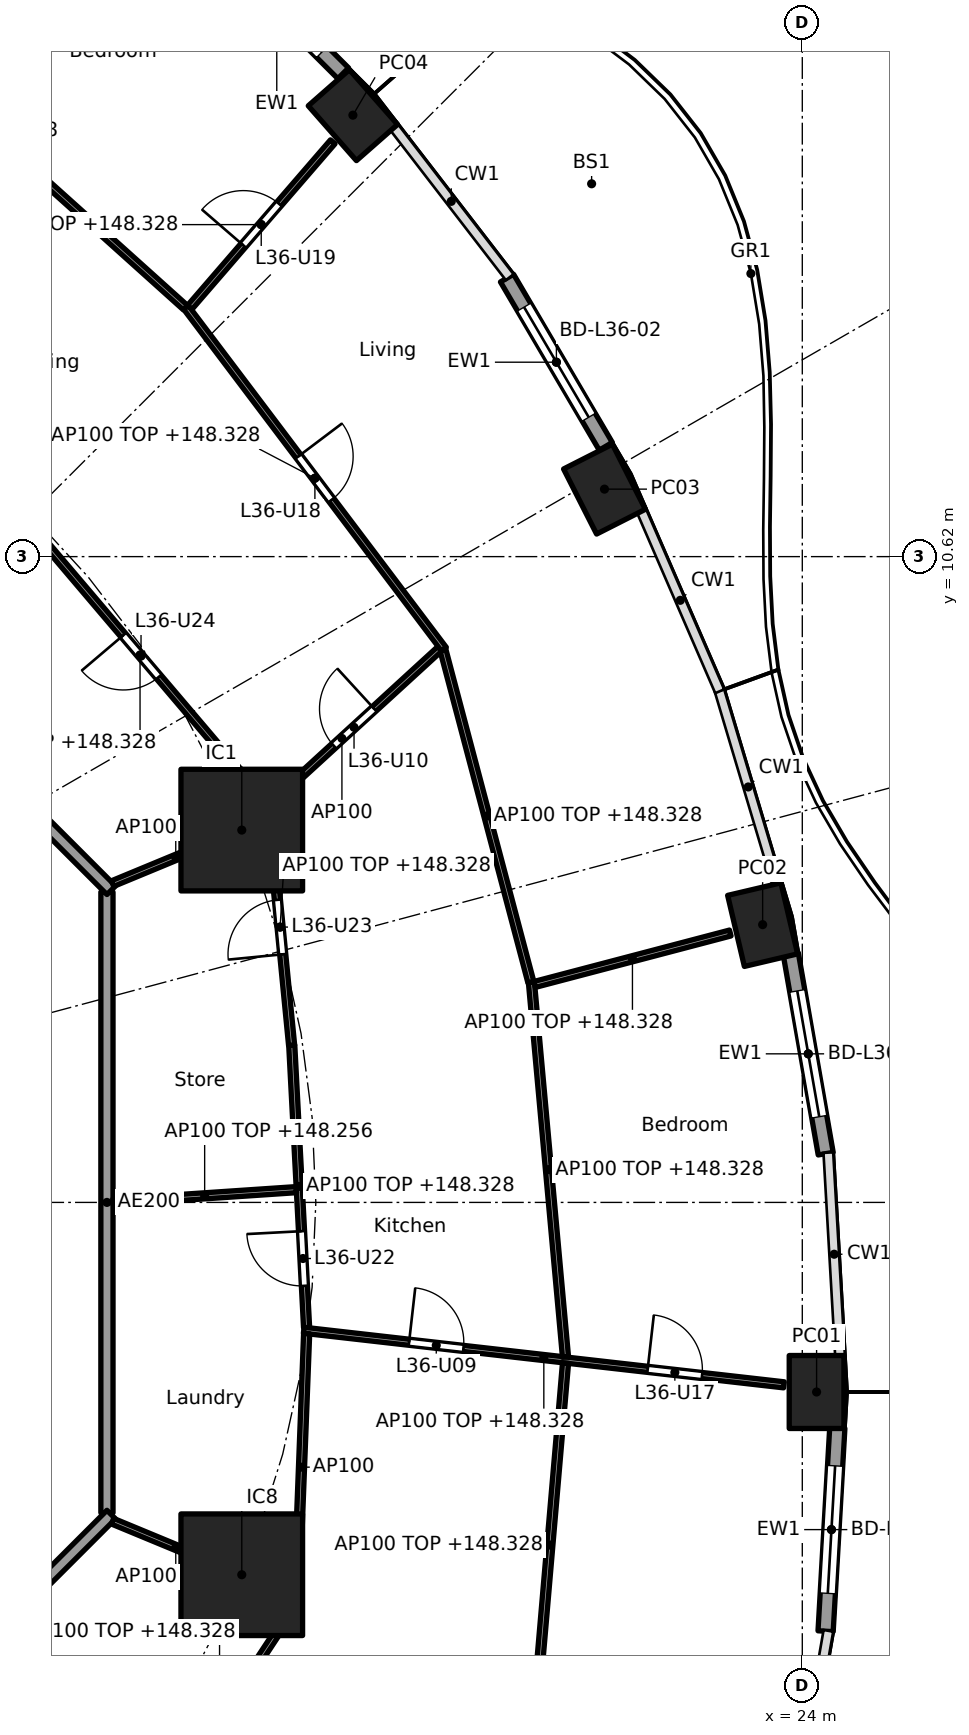
"""IFC4 building model, lengths in metres.
Left out: names, types, materials, properties, quantities, classifications, styles, units other than length and angle.
Written with IfcOpenShell. Run it as: python <this file> out.ifc"""

import sys

from ifc_helpers import new_model, si_unit, direction, frame, frame_2d, origin, origin_2d, place, context, subcontext, project, spatial, rectangle, hollow_rectangle, extrude, element, fill, save


model = new_model("IFC4")
c1 = context("Model", 3, precision=1e-05, world=origin(), true_north=direction((0.0, 1.0)))
c2 = subcontext(c1, "Body", "Model", "MODEL_VIEW")
j1 = project(units=[si_unit("LENGTHUNIT", "METRE"), si_unit("PLANEANGLEUNIT", "RADIAN")], contexts=[c1])
p1 = place(None, origin())
s1 = spatial("IfcSite", under=j1, at=p1, CompositionType="ELEMENT")
p2 = place(p1, origin())
s2 = spatial("IfcBuilding", under=s1, at=p2, CompositionType="ELEMENT")
p3 = place(p2, frame((0.0, 0.0, 145.5)))
s3 = spatial("IfcBuildingStorey", under=s2, at=p3, CompositionType="ELEMENT", Elevation=145.5)
for number, where, z_axis, x_axis in (
    (1, (24.235, -3.118, 0.0), (0.0, 0.0, 1.0), (0.0, 1.0, 0.0)),
    (2, (23.348, 4.568, 0.0), (0.0, 0.0, 1.0), (-0.229, 0.973, 0.0)),
    (3, (20.747, 11.73, 0.0), (0.0, 0.0, 1.0), (-0.452, 0.892, 0.0)),
    (4, (16.61, 17.88, 0.0), (0.0, 0.0, 1.0), (-0.66, 0.751, 0.0)),
):
    element("IfcColumn", number, at=place(p3, frame(where, z_axis=z_axis, x_axis=x_axis)), inside=s3, PredefinedType="COLUMN", context=c2, shape_type="SweptSolid", body=[
        extrude(hollow_rectangle(XDim=1.2, YDim=0.9, WallThickness=0.04, at=origin_2d()), origin(), (0.0, 0.0, 1.0), 3.7),
    ])
for number, where, z_axis, x_axis in (
    (5, (14.782, 6.123, 0.0), (0.0, 0.0, 1.0), (1.0, 0.0, 0.0)),
    (6, (14.782, -6.123, 0.0), (0.0, 0.0, 1.0), (1.0, 0.0, 0.0)),
):
    element("IfcColumn", number, at=place(p3, frame(where, z_axis=z_axis, x_axis=x_axis)), inside=s3, PredefinedType="COLUMN", context=c2, shape_type="SweptSolid", body=[
        extrude(rectangle(XDim=2.0, YDim=2.0, at=origin_2d()), origin(), (0.0, 0.0, 1.0), 3.7),
    ])
p4 = place(p3, frame((23.811, 4.085, 0.0), z_axis=(0.0, 0.0, 1.0), x_axis=(0.172163521006, -0.985068384446, 0.0)))
e7 = element("IfcWall", 7, at=p4, inside=s3, PredefinedType="SOLIDWALL", context=c2, shape_type="SweptSolid", body=[
    extrude(rectangle(XDim=3.333, YDim=0.25, at=frame_2d((1.666, 0.0))), origin(), (0.0, 0.0, 1.0), 3.44),
])
p5 = place(p4, frame((0.616, 0.0, 0.0)))
e8 = element("IfcOpeningElement", 8, at=p5, cuts=e7, PredefinedType="OPENING", context=c2, shape_type="SweptSolid", body=[
    extrude(rectangle(XDim=2.1, YDim=2.4, at=frame_2d((1.05, 1.2))), frame((0.0, 0.135, 0.0), z_axis=(0.0, -1.0, 0.0), x_axis=(1.0, 0.0, 0.0)), (0.0, 0.0, 1.0), 0.27),
])
p6 = place(p3, frame((19.144, 15.201, 0.0), z_axis=(0.0, 0.0, 1.0), x_axis=(0.506314982873, -0.862348617508, 0.0)))
e9 = element("IfcWall", 9, at=p6, inside=s3, PredefinedType="SOLIDWALL", context=c2, shape_type="SweptSolid", body=[
    extrude(rectangle(XDim=3.208, YDim=0.25, at=frame_2d((1.604, 0.0))), origin(), (0.0, 0.0, 1.0), 3.44),
])
p7 = place(p6, frame((0.554, 0.0, 0.0)))
e10 = element("IfcOpeningElement", 10, at=p7, cuts=e9, PredefinedType="OPENING", context=c2, shape_type="SweptSolid", body=[
    extrude(rectangle(XDim=2.1, YDim=2.4, at=frame_2d((1.05, 1.2))), frame((0.0, 0.135, 0.0), z_axis=(0.0, -1.0, 0.0), x_axis=(1.0, 0.0, 0.0)), (0.0, 0.0, 1.0), 0.27),
])
p8 = place(p3, frame((14.265, 20.749, 0.0), z_axis=(0.0, 0.0, 1.0), x_axis=(0.70789728551, -0.706315392135, 0.0)))
e11 = element("IfcWall", 11, at=p8, inside=s3, PredefinedType="SOLIDWALL", context=c2, shape_type="SweptSolid", body=[
    extrude(rectangle(XDim=3.087, YDim=0.25, at=frame_2d((1.543, 0.0))), origin(), (0.0, 0.0, 1.0), 3.44),
])
p9 = place(p8, frame((0.493, 0.0, 0.0)))
e12 = element("IfcOpeningElement", 12, at=p9, cuts=e11, PredefinedType="OPENING", context=c2, shape_type="SweptSolid", body=[
    extrude(rectangle(XDim=2.1, YDim=2.4, at=frame_2d((1.05, 1.2))), frame((0.0, 0.135, 0.0), z_axis=(0.0, -1.0, 0.0), x_axis=(1.0, 0.0, 0.0)), (0.0, 0.0, 1.0), 0.27),
])
p10 = place(p3, frame((24.576, -3.709, 0.0), z_axis=(0.0, 0.0, 1.0), x_axis=(-0.05746514539, -0.998347513176, 0.0)))
e13 = element("IfcWall", 13, at=p10, inside=s3, PredefinedType="SOLIDWALL", context=c2, shape_type="SweptSolid", body=[
    extrude(rectangle(XDim=3.348, YDim=0.25, at=frame_2d((1.674, 0.0))), origin(), (0.0, 0.0, 1.0), 3.44),
])
p11 = place(p10, frame((0.624, 0.0, 0.0)))
e14 = element("IfcOpeningElement", 14, at=p11, cuts=e13, PredefinedType="OPENING", context=c2, shape_type="SweptSolid", body=[
    extrude(rectangle(XDim=2.1, YDim=2.4, at=frame_2d((1.05, 1.2))), frame((0.0, 0.135, 0.0), z_axis=(0.0, -1.0, 0.0), x_axis=(1.0, 0.0, 0.0)), (0.0, 0.0, 1.0), 0.27),
])
p12 = place(p3, frame((12.565, -5.104, 0.0), z_axis=(0.0, 0.0, 1.0), x_axis=(0.0, 1.0, 0.0)))
e15 = element("IfcWall", 15, at=p12, inside=s3, PredefinedType="PARTITIONING", context=c2, shape_type="SweptSolid", body=[
    extrude(rectangle(XDim=10.209, YDim=0.2, at=frame_2d((5.104, 0.0))), origin(), (0.0, 0.0, 1.0), 3.44),
])
p13 = place(p3, frame((12.635, 5.134, 0.0), z_axis=(0.0, 0.0, 1.0), x_axis=(-0.707106781187, 0.707106781187, 0.0)))
e16 = element("IfcWall", 16, at=p13, inside=s3, PredefinedType="PARTITIONING", context=c2, shape_type="SweptSolid", body=[
    extrude(rectangle(XDim=10.609, YDim=0.2, at=frame_2d((5.305, 0.0))), origin(), (0.0, 0.0, 1.0), 3.44),
])
p14 = place(p3, frame((5.275, -12.494, 0.0), z_axis=(0.0, 0.0, 1.0), x_axis=(0.707106781187, 0.707106781187, 0.0)))
e17 = element("IfcWall", 17, at=p14, inside=s3, PredefinedType="PARTITIONING", context=c2, shape_type="SweptSolid", body=[
    extrude(rectangle(XDim=10.409, YDim=0.2, at=frame_2d((5.205, 0.0))), origin(), (0.0, 0.0, 1.0), 3.44),
])
p15 = place(p3, frame((15.801, -2.103, 0.0), z_axis=(0.0, 0.0, 1.0), x_axis=(0.993607212763, -0.112892456544, 0.0)))
e18 = element("IfcWall", 18, at=p15, inside=s3, PredefinedType="PARTITIONING", context=c2, shape_type="SweptSolid", body=[
    extrude(rectangle(XDim=7.948, YDim=0.1, at=frame_2d((3.974, 0.0))), origin(), (0.0, 0.0, 1.0), 2.828),
])
p16 = place(p15, frame((1.743, 0.0, 0.0)))
e19 = element("IfcOpeningElement", 19, at=p16, cuts=e18, PredefinedType="OPENING", context=c2, shape_type="SweptSolid", body=[
    extrude(rectangle(XDim=0.9, YDim=2.1, at=frame_2d((0.45, 1.05))), frame((0.0, 0.06, 0.0), z_axis=(0.0, -1.0, 0.0), x_axis=(1.0, 0.0, 0.0)), (0.0, 0.0, 1.0), 0.12),
])
p17 = place(p15, frame((5.692, 0.0, 0.0)))
e20 = element("IfcOpeningElement", 20, at=p17, cuts=e18, PredefinedType="OPENING", context=c2, shape_type="SweptSolid", body=[
    extrude(rectangle(XDim=0.9, YDim=2.1, at=frame_2d((0.45, 1.05))), frame((0.0, 0.06, 0.0), z_axis=(0.0, -1.0, 0.0), x_axis=(1.0, 0.0, 0.0)), (0.0, 0.0, 1.0), 0.12),
])
p18 = place(p3, frame((15.848, -2.058, 0.0), z_axis=(0.0, 0.0, 1.0), x_axis=(-0.052509224895, 0.998620439056, 0.0)))
e21 = element("IfcWall", 21, at=p18, inside=s3, PredefinedType="PARTITIONING", context=c2, shape_type="SweptSolid", body=[
    extrude(rectangle(XDim=4.649, YDim=0.1, at=frame_2d((2.325, 0.0))), origin(), (0.0, 0.0, 1.0), 2.828),
])
p19 = place(p18, frame((0.687, 0.0, 0.0)))
e22 = element("IfcOpeningElement", 22, at=p19, cuts=e21, PredefinedType="OPENING", context=c2, shape_type="SweptSolid", body=[
    extrude(rectangle(XDim=0.9, YDim=2.1, at=frame_2d((0.45, 1.05))), frame((0.0, 0.06, 0.0), z_axis=(0.0, -1.0, 0.0), x_axis=(1.0, 0.0, 0.0)), (0.0, 0.0, 1.0), 0.12),
])
p20 = place(p3, frame((15.849, -2.158, 0.0), z_axis=(0.0, 0.0, 1.0), x_axis=(-0.038390448414, -0.999262815014, 0.0)))
e23 = element("IfcWall", 23, at=p20, inside=s3, PredefinedType="PARTITIONING", context=c2, shape_type="SweptSolid", body=[
    extrude(rectangle(XDim=4.394, YDim=0.1, at=frame_2d((2.197, 0.0))), origin(), (0.0, 0.0, 1.0), 3.44),
])
p21 = place(p3, frame((20.106, -2.542, 0.0), z_axis=(0.0, 0.0, 1.0), x_axis=(-0.090567755363, 0.995890296011, 0.0)))
e24 = element("IfcWall", 24, at=p21, inside=s3, PredefinedType="PARTITIONING", context=c2, shape_type="SweptSolid", body=[
    extrude(rectangle(XDim=6.189, YDim=0.1, at=frame_2d((3.095, 0.0))), origin(), (0.0, 0.0, 1.0), 2.828),
])
p22 = place(p3, frame((20.106, -2.642, 0.0), z_axis=(0.0, 0.0, 1.0), x_axis=(-0.085672025822, -0.996323393277, 0.0)))
e25 = element("IfcWall", 25, at=p22, inside=s3, PredefinedType="PARTITIONING", context=c2, shape_type="SweptSolid", body=[
    extrude(rectangle(XDim=6.007, YDim=0.1, at=frame_2d((3.003, 0.0))), origin(), (0.0, 0.0, 1.0), 2.828),
])
p23 = place(p3, frame((12.665, 0.007, 0.0), z_axis=(0.0, 0.0, 1.0), x_axis=(0.997736982365, 0.067237742534, 0.0)))
e26 = element("IfcWall", 26, at=p23, inside=s3, PredefinedType="PARTITIONING", context=c2, shape_type="SweptSolid", body=[
    extrude(rectangle(XDim=3.021, YDim=0.1, at=frame_2d((1.51, 0.0))), origin(), (0.0, 0.0, 1.0), 2.756),
])
p24 = place(p3, frame((15.602, 2.584, 0.0), z_axis=(0.0, 0.0, 1.0), x_axis=(-0.097207196705, 0.995264166394, 0.0)))
e27 = element("IfcWall", 27, at=p24, inside=s3, PredefinedType="PARTITIONING", context=c2, shape_type="SweptSolid", body=[
    extrude(rectangle(XDim=3.906, YDim=0.1, at=frame_2d((1.953, 0.0))), origin(), (0.0, 0.0, 1.0), 2.828),
])
p25 = place(p24, frame((1.503, 0.0, 0.0)))
e28 = element("IfcOpeningElement", 28, at=p25, cuts=e27, PredefinedType="OPENING", context=c2, shape_type="SweptSolid", body=[
    extrude(rectangle(XDim=0.9, YDim=2.1, at=frame_2d((0.45, 1.05))), frame((0.0, 0.06, 0.0), z_axis=(0.0, -1.0, 0.0), x_axis=(1.0, 0.0, 0.0)), (0.0, 0.0, 1.0), 0.12),
])
p26 = place(p3, frame((19.598, 3.584, 0.0), z_axis=(0.0, 0.0, 1.0), x_axis=(0.967108750962, 0.254363251695, 0.0)))
e29 = element("IfcWall", 29, at=p26, inside=s3, PredefinedType="PARTITIONING", context=c2, shape_type="SweptSolid", body=[
    extrude(rectangle(XDim=3.327, YDim=0.1, at=frame_2d((1.663, 0.0))), origin(), (0.0, 0.0, 1.0), 2.828),
])
p27 = place(p3, frame((19.537, 3.62, 0.0), z_axis=(0.0, 0.0, 1.0), x_axis=(-0.255892560316, 0.966705227862, 0.0)))
e30 = element("IfcWall", 30, at=p27, inside=s3, PredefinedType="PARTITIONING", context=c2, shape_type="SweptSolid", body=[
    extrude(rectangle(XDim=5.659, YDim=0.1, at=frame_2d((2.829, 0.0))), origin(), (0.0, 0.0, 1.0), 2.828),
])
p28 = place(p3, frame((12.657, 5.243, 0.0), z_axis=(0.0, 0.0, 1.0), x_axis=(0.923848837015, 0.382757529444, 0.0)))
e31 = element("IfcWall", 31, at=p28, inside=s3, PredefinedType="PARTITIONING", context=c2, shape_type="SweptSolid", body=[
    extrude(rectangle(XDim=2.25, YDim=0.1, at=frame_2d((1.125, 0.0))), origin(), (0.0, 0.0, 1.0), 3.44),
])
p29 = place(p3, frame((14.819, 6.157, 0.0), z_axis=(0.0, 0.0, 1.0), x_axis=(0.737620514432, 0.675215503887, 0.0)))
e32 = element("IfcWall", 32, at=p29, inside=s3, PredefinedType="PARTITIONING", context=c2, shape_type="SweptSolid", body=[
    extrude(rectangle(XDim=4.366, YDim=0.1, at=frame_2d((2.183, 0.0))), origin(), (0.0, 0.0, 1.0), 3.44),
])
p30 = place(p29, frame((2.003, 0.0, 0.0)))
e33 = element("IfcOpeningElement", 33, at=p30, cuts=e32, PredefinedType="OPENING", context=c2, shape_type="SweptSolid", body=[
    extrude(rectangle(XDim=0.9, YDim=2.1, at=frame_2d((0.45, 1.05))), frame((0.0, 0.06, 0.0), z_axis=(0.0, -1.0, 0.0), x_axis=(1.0, 0.0, 0.0)), (0.0, 0.0, 1.0), 0.12),
])
p31 = place(p3, frame((15.185, 6.559, 0.0), z_axis=(0.0, 0.0, 1.0), x_axis=(-0.647361044962, 0.762183493304, 0.0)))
e34 = element("IfcWall", 34, at=p31, inside=s3, PredefinedType="PARTITIONING", context=c2, shape_type="SweptSolid", body=[
    extrude(rectangle(XDim=6.413, YDim=0.1, at=frame_2d((3.207, 0.0))), origin(), (0.0, 0.0, 1.0), 2.828),
])
p32 = place(p31, frame((2.731, 0.0, 0.0)))
e35 = element("IfcOpeningElement", 35, at=p32, cuts=e34, PredefinedType="OPENING", context=c2, shape_type="SweptSolid", body=[
    extrude(rectangle(XDim=0.9, YDim=2.1, at=frame_2d((0.45, 1.05))), frame((0.0, 0.06, 0.0), z_axis=(0.0, -1.0, 0.0), x_axis=(1.0, 0.0, 0.0)), (0.0, 0.0, 1.0), 0.12),
])
p33 = place(p3, frame((18.106, 9.098, 0.0), z_axis=(0.0, 0.0, 1.0), x_axis=(-0.602398572907, 0.798195439325, 0.0)))
e36 = element("IfcWall", 36, at=p33, inside=s3, PredefinedType="PARTITIONING", context=c2, shape_type="SweptSolid", body=[
    extrude(rectangle(XDim=7.044, YDim=0.1, at=frame_2d((3.522, 0.0))), origin(), (0.0, 0.0, 1.0), 2.828),
])
p34 = place(p33, frame((3.072, 0.0, 0.0)))
e37 = element("IfcOpeningElement", 37, at=p34, cuts=e36, PredefinedType="OPENING", context=c2, shape_type="SweptSolid", body=[
    extrude(rectangle(XDim=0.9, YDim=2.1, at=frame_2d((0.45, 1.05))), frame((0.0, 0.06, 0.0), z_axis=(0.0, -1.0, 0.0), x_axis=(1.0, 0.0, 0.0)), (0.0, 0.0, 1.0), 0.12),
])
p35 = place(p3, frame((13.926, 14.719, 0.0), z_axis=(0.0, 0.0, 1.0), x_axis=(0.653831857253, 0.756639876323, 0.0)))
e38 = element("IfcWall", 38, at=p35, inside=s3, PredefinedType="PARTITIONING", context=c2, shape_type="SweptSolid", body=[
    extrude(rectangle(XDim=3.598, YDim=0.1, at=frame_2d((1.799, 0.0))), origin(), (0.0, 0.0, 1.0), 2.828),
])
p36 = place(p35, frame((1.349, 0.0, 0.0)))
e39 = element("IfcOpeningElement", 39, at=p36, cuts=e38, PredefinedType="OPENING", context=c2, shape_type="SweptSolid", body=[
    extrude(rectangle(XDim=0.9, YDim=2.1, at=frame_2d((0.45, 1.05))), frame((0.0, 0.06, 0.0), z_axis=(0.0, -1.0, 0.0), x_axis=(1.0, 0.0, 0.0)), (0.0, 0.0, 1.0), 0.12),
])
p37 = place(p3, frame((13.856, 14.714, 0.0), z_axis=(0.0, 0.0, 1.0), x_axis=(-0.743799395746, 0.668402916577, 0.0)))
e40 = element("IfcWall", 40, at=p37, inside=s3, PredefinedType="PARTITIONING", context=c2, shape_type="SweptSolid", body=[
    extrude(rectangle(XDim=6.509, YDim=0.1, at=frame_2d((3.254, 0.0))), origin(), (0.0, 0.0, 1.0), 2.828),
])
p38 = place(p3, frame((13.127, -10.467, 0.0), z_axis=(0.0, 0.0, 1.0), x_axis=(0.550614843759, 0.834759422727, 0.0)))
e41 = element("IfcWall", 41, at=p38, inside=s3, PredefinedType="PARTITIONING", context=c2, shape_type="SweptSolid", body=[
    extrude(rectangle(XDim=4.683, YDim=0.1, at=frame_2d((2.341, 0.0))), origin(), (0.0, 0.0, 1.0), 2.828),
])
p39 = place(p38, frame((1.866, 0.0, 0.0)))
e42 = element("IfcOpeningElement", 42, at=p39, cuts=e41, PredefinedType="OPENING", context=c2, shape_type="SweptSolid", body=[
    extrude(rectangle(XDim=0.9, YDim=2.1, at=frame_2d((0.45, 1.05))), frame((0.0, 0.06, 0.0), z_axis=(0.0, -1.0, 0.0), x_axis=(1.0, 0.0, 0.0)), (0.0, 0.0, 1.0), 0.12),
])
p40 = place(p3, frame((12.657, -5.243, 0.0), z_axis=(0.0, 0.0, 1.0), x_axis=(0.923864733477, -0.382719158442, 0.0)))
e43 = element("IfcWall", 43, at=p40, inside=s3, PredefinedType="PARTITIONING", context=c2, shape_type="SweptSolid", body=[
    extrude(rectangle(XDim=2.25, YDim=0.1, at=frame_2d((1.125, 0.0))), origin(), (0.0, 0.0, 1.0), 3.44),
])
p41 = place(p5, origin())
e44 = element("IfcDoor", 44, at=p41, inside=s3, OperationType="SLIDING_TO_LEFT", PredefinedType="DOOR", context=c2, shape_type="SweptSolid", body=[
    extrude(rectangle(XDim=2.1, YDim=2.4, at=frame_2d((1.05, 1.2))), frame((0.0, 0.025, 0.0), z_axis=(0.0, -1.0, 0.0), x_axis=(1.0, 0.0, 0.0)), (0.0, 0.0, 1.0), 0.05),
])
fill(e8, e44)
p42 = place(p7, origin())
e45 = element("IfcDoor", 45, at=p42, inside=s3, OperationType="SLIDING_TO_LEFT", PredefinedType="DOOR", context=c2, shape_type="SweptSolid", body=[
    extrude(rectangle(XDim=2.1, YDim=2.4, at=frame_2d((1.05, 1.2))), frame((0.0, 0.025, 0.0), z_axis=(0.0, -1.0, 0.0), x_axis=(1.0, 0.0, 0.0)), (0.0, 0.0, 1.0), 0.05),
])
fill(e10, e45)
p43 = place(p9, origin())
e46 = element("IfcDoor", 46, at=p43, inside=s3, OperationType="SLIDING_TO_LEFT", PredefinedType="DOOR", context=c2, shape_type="SweptSolid", body=[
    extrude(rectangle(XDim=2.1, YDim=2.4, at=frame_2d((1.05, 1.2))), frame((0.0, 0.025, 0.0), z_axis=(0.0, -1.0, 0.0), x_axis=(1.0, 0.0, 0.0)), (0.0, 0.0, 1.0), 0.05),
])
fill(e12, e46)
p44 = place(p11, origin())
e47 = element("IfcDoor", 47, at=p44, inside=s3, OperationType="SLIDING_TO_LEFT", PredefinedType="DOOR", context=c2, shape_type="SweptSolid", body=[
    extrude(rectangle(XDim=2.1, YDim=2.4, at=frame_2d((1.05, 1.2))), frame((0.0, 0.025, 0.0), z_axis=(0.0, -1.0, 0.0), x_axis=(1.0, 0.0, 0.0)), (0.0, 0.0, 1.0), 0.05),
])
fill(e14, e47)
p45 = place(p16, origin())
e48 = element("IfcDoor", 48, at=p45, inside=s3, OperationType="SINGLE_SWING_LEFT", PredefinedType="DOOR", context=c2, shape_type="SweptSolid", body=[
    extrude(rectangle(XDim=0.9, YDim=2.1, at=frame_2d((0.45, 1.05))), frame((0.0, 0.025, 0.0), z_axis=(0.0, -1.0, 0.0), x_axis=(1.0, 0.0, 0.0)), (0.0, 0.0, 1.0), 0.05),
])
fill(e19, e48)
p46 = place(p30, origin())
e49 = element("IfcDoor", 49, at=p46, inside=s3, OperationType="SINGLE_SWING_RIGHT", PredefinedType="DOOR", context=c2, shape_type="SweptSolid", body=[
    extrude(rectangle(XDim=0.9, YDim=2.1, at=frame_2d((0.45, 1.05))), frame((0.0, 0.025, 0.0), z_axis=(0.0, -1.0, 0.0), x_axis=(1.0, 0.0, 0.0)), (0.0, 0.0, 1.0), 0.05),
])
fill(e33, e49)
p47 = place(p17, origin())
e50 = element("IfcDoor", 50, at=p47, inside=s3, OperationType="SINGLE_SWING_LEFT", PredefinedType="DOOR", context=c2, shape_type="SweptSolid", body=[
    extrude(rectangle(XDim=0.9, YDim=2.1, at=frame_2d((0.45, 1.05))), frame((0.0, 0.025, 0.0), z_axis=(0.0, -1.0, 0.0), x_axis=(1.0, 0.0, 0.0)), (0.0, 0.0, 1.0), 0.05),
])
fill(e20, e50)
p48 = place(p34, frame((0.9, 0.0, 0.0), x_axis=(-1.0, 0.0, 0.0)))
e51 = element("IfcDoor", 51, at=p48, inside=s3, OperationType="SINGLE_SWING_LEFT", PredefinedType="DOOR", context=c2, shape_type="SweptSolid", body=[
    extrude(rectangle(XDim=0.9, YDim=2.1, at=frame_2d((0.45, 1.05))), frame((0.0, 0.025, 0.0), z_axis=(0.0, -1.0, 0.0), x_axis=(1.0, 0.0, 0.0)), (0.0, 0.0, 1.0), 0.05),
])
fill(e37, e51)
p49 = place(p36, origin())
e52 = element("IfcDoor", 52, at=p49, inside=s3, OperationType="SINGLE_SWING_LEFT", PredefinedType="DOOR", context=c2, shape_type="SweptSolid", body=[
    extrude(rectangle(XDim=0.9, YDim=2.1, at=frame_2d((0.45, 1.05))), frame((0.0, 0.025, 0.0), z_axis=(0.0, -1.0, 0.0), x_axis=(1.0, 0.0, 0.0)), (0.0, 0.0, 1.0), 0.05),
])
fill(e39, e52)
p50 = place(p19, origin())
e53 = element("IfcDoor", 53, at=p50, inside=s3, OperationType="SINGLE_SWING_RIGHT", PredefinedType="DOOR", context=c2, shape_type="SweptSolid", body=[
    extrude(rectangle(XDim=0.9, YDim=2.1, at=frame_2d((0.45, 1.05))), frame((0.0, 0.025, 0.0), z_axis=(0.0, -1.0, 0.0), x_axis=(1.0, 0.0, 0.0)), (0.0, 0.0, 1.0), 0.05),
])
fill(e22, e53)
p51 = place(p25, origin())
e54 = element("IfcDoor", 54, at=p51, inside=s3, OperationType="SINGLE_SWING_LEFT", PredefinedType="DOOR", context=c2, shape_type="SweptSolid", body=[
    extrude(rectangle(XDim=0.9, YDim=2.1, at=frame_2d((0.45, 1.05))), frame((0.0, 0.025, 0.0), z_axis=(0.0, -1.0, 0.0), x_axis=(1.0, 0.0, 0.0)), (0.0, 0.0, 1.0), 0.05),
])
fill(e28, e54)
p52 = place(p32, origin())
e55 = element("IfcDoor", 55, at=p52, inside=s3, OperationType="SINGLE_SWING_RIGHT", PredefinedType="DOOR", context=c2, shape_type="SweptSolid", body=[
    extrude(rectangle(XDim=0.9, YDim=2.1, at=frame_2d((0.45, 1.05))), frame((0.0, 0.025, 0.0), z_axis=(0.0, -1.0, 0.0), x_axis=(1.0, 0.0, 0.0)), (0.0, 0.0, 1.0), 0.05),
])
fill(e35, e55)
save(model, sys.argv[1])
